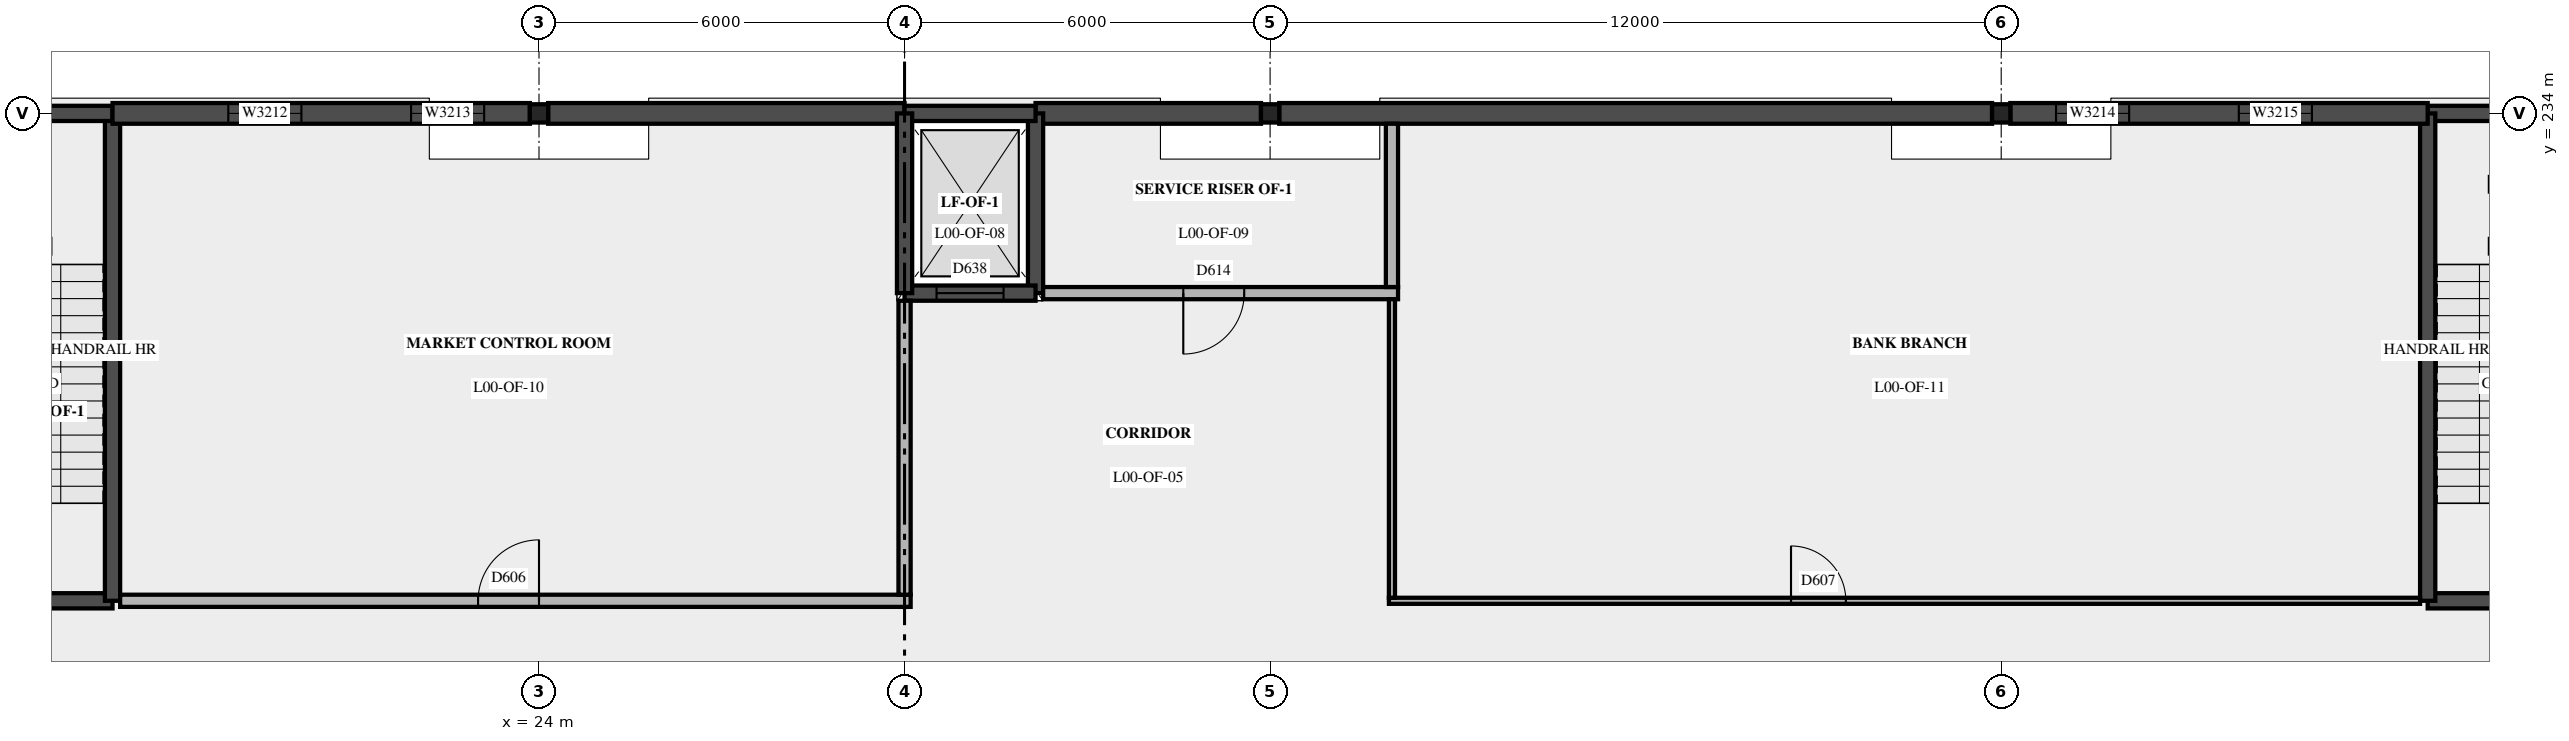
"""IFC4 building model, lengths in metres.
Left out: names, types, materials, properties, quantities, classifications, styles, units other than length and angle.
Written with IfcOpenShell. Run it as: python <this file> out.ifc"""

import sys

from ifc_helpers import new_model, si_unit, direction, frame, frame_2d, origin, origin_2d, place, context, subcontext, project, spatial, rectangle, i_section, extrude, element, fill, save


model = new_model("IFC4")
c1 = context("Model", 3, precision=1e-05, world=origin(), true_north=direction((0.0, 1.0)))
c2 = subcontext(c1, "Body", "Model", "MODEL_VIEW")
j1 = project(units=[si_unit("LENGTHUNIT", "METRE"), si_unit("PLANEANGLEUNIT", "RADIAN")], contexts=[c1])
p1 = place(None, origin())
s1 = spatial("IfcSite", under=j1, at=p1, CompositionType="ELEMENT")
p2 = place(p1, origin())
s2 = spatial("IfcBuilding", under=s1, at=p2, CompositionType="ELEMENT")
p3 = place(p2, origin())
s3 = spatial("IfcBuildingStorey", under=s2, at=p3, CompositionType="ELEMENT", Elevation=0.0)
for number, where, z_axis, x_axis in (
    (1, (24.0, 234.0, 0.0), (0.0, 0.0, 1.0), (1.0, 0.0, 0.0)),
    (2, (36.0, 234.0, 0.0), (0.0, 0.0, 1.0), (1.0, 0.0, 0.0)),
    (3, (48.0, 234.0, 0.0), (0.0, 0.0, 1.0), (1.0, 0.0, 0.0)),
):
    element("IfcColumn", number, at=place(p3, frame(where, z_axis=z_axis, x_axis=x_axis)), inside=s3, PredefinedType="COLUMN", context=c2, shape_type="SweptSolid", body=[
        extrude(i_section(OverallWidth=0.3, OverallDepth=0.3, WebThickness=0.011, FlangeThickness=0.019, at=origin_2d()), origin(), (0.0, 0.0, 1.0), 5.4),
    ])
p4 = place(p3, frame((12.0, 226.0, 0.0), z_axis=(0.0, 0.0, 1.0), x_axis=(1.0, 0.0, 0.0)))
e4 = element("IfcWall", 4, at=p4, inside=s3, PredefinedType="SHEAR", context=c2, shape_type="SweptSolid", body=[
    extrude(rectangle(XDim=5.0, YDim=0.25, at=frame_2d((2.5, 0.0))), origin(), (0.0, 0.0, 1.0), 5.4),
])
p5 = place(p4, frame((2.0, 0.0, 0.0)))
e5 = element("IfcOpeningElement", 5, at=p5, cuts=e4, PredefinedType="OPENING", context=c2, shape_type="SweptSolid", body=[
    extrude(rectangle(XDim=1.0, YDim=2.1, at=frame_2d((0.5, 1.05))), frame((0.0, 0.135, 0.0), z_axis=(0.0, -1.0, 0.0), x_axis=(1.0, 0.0, 0.0)), (0.0, 0.0, 1.0), 0.27),
])
p6 = place(p3, frame((17.0, 226.0, 0.0), z_axis=(0.0, 0.0, 1.0), x_axis=(0.0, 1.0, 0.0)))
e6 = element("IfcWall", 6, at=p6, inside=s3, PredefinedType="SHEAR", context=c2, shape_type="SweptSolid", body=[
    extrude(rectangle(XDim=8.0, YDim=0.25, at=frame_2d((4.0, 0.0))), origin(), (0.0, 0.0, 1.0), 5.4),
])
p7 = place(p3, frame((12.6, 234.0, 0.0), z_axis=(0.0, 0.0, 1.0), x_axis=(1.0, 0.0, 0.0)))
e7 = element("IfcWall", 7, at=p7, inside=s3, PredefinedType="SHEAR", context=c2, shape_type="SweptSolid", body=[
    extrude(rectangle(XDim=4.4, YDim=0.25, at=frame_2d((2.2, 0.0))), origin(), (0.0, 0.0, 1.0), 5.4),
])
p8 = place(p7, frame((1.4, 0.0, 0.0)))
e8 = element("IfcOpeningElement", 8, at=p8, cuts=e7, PredefinedType="OPENING", context=c2, shape_type="SweptSolid", body=[
    extrude(rectangle(XDim=1.0, YDim=2.1, at=frame_2d((0.5, 1.05))), frame((0.0, 0.135, 0.0), z_axis=(0.0, -1.0, 0.0), x_axis=(1.0, 0.0, 0.0)), (0.0, 0.0, 1.0), 0.27),
])
p9 = place(p3, frame((55.0, 226.0, 0.0), z_axis=(0.0, 0.0, 1.0), x_axis=(1.0, 0.0, 0.0)))
e9 = element("IfcWall", 9, at=p9, inside=s3, PredefinedType="SHEAR", context=c2, shape_type="SweptSolid", body=[
    extrude(rectangle(XDim=5.0, YDim=0.25, at=frame_2d((2.5, 0.0))), origin(), (0.0, 0.0, 1.0), 5.4),
])
p10 = place(p9, frame((2.0, 0.0, 0.0)))
e10 = element("IfcOpeningElement", 10, at=p10, cuts=e9, PredefinedType="OPENING", context=c2, shape_type="SweptSolid", body=[
    extrude(rectangle(XDim=1.0, YDim=2.1, at=frame_2d((0.5, 1.05))), frame((0.0, 0.135, 0.0), z_axis=(0.0, -1.0, 0.0), x_axis=(1.0, 0.0, 0.0)), (0.0, 0.0, 1.0), 0.27),
])
p11 = place(p3, frame((55.0, 234.0, 0.0), z_axis=(0.0, 0.0, 1.0), x_axis=(1.0, 0.0, 0.0)))
e11 = element("IfcWall", 11, at=p11, inside=s3, PredefinedType="SHEAR", context=c2, shape_type="SweptSolid", body=[
    extrude(rectangle(XDim=4.4, YDim=0.25, at=frame_2d((2.2, 0.0))), origin(), (0.0, 0.0, 1.0), 5.4),
])
p12 = place(p11, frame((2.0, 0.0, 0.0)))
e12 = element("IfcOpeningElement", 12, at=p12, cuts=e11, PredefinedType="OPENING", context=c2, shape_type="SweptSolid", body=[
    extrude(rectangle(XDim=1.0, YDim=2.1, at=frame_2d((0.5, 1.05))), frame((0.0, 0.135, 0.0), z_axis=(0.0, -1.0, 0.0), x_axis=(1.0, 0.0, 0.0)), (0.0, 0.0, 1.0), 0.27),
])
p13 = place(p3, frame((55.0, 226.0, 0.0), z_axis=(0.0, 0.0, 1.0), x_axis=(0.0, 1.0, 0.0)))
e13 = element("IfcWall", 13, at=p13, inside=s3, PredefinedType="SHEAR", context=c2, shape_type="SweptSolid", body=[
    extrude(rectangle(XDim=8.0, YDim=0.25, at=frame_2d((4.0, 0.0))), origin(), (0.0, 0.0, 1.0), 5.4),
])
p14 = place(p3, frame((17.0, 234.0, 0.0), z_axis=(0.0, 0.0, 1.0), x_axis=(1.0, 0.0, 0.0)))
e14 = element("IfcWall", 14, at=p14, inside=s3, PredefinedType="SOLIDWALL", context=c2, shape_type="SweptSolid", body=[
    extrude(rectangle(XDim=6.85, YDim=0.34, at=frame_2d((3.425, 0.0))), origin(), (0.0, 0.0, 1.0), 5.4),
])
p15 = place(p14, frame((1.9, 0.0, 0.9)))
e15 = element("IfcOpeningElement", 15, at=p15, cuts=e14, PredefinedType="OPENING", context=c2, shape_type="SweptSolid", body=[
    extrude(rectangle(XDim=1.2, YDim=3.3, at=frame_2d((0.6, 1.65))), frame((0.0, 0.18, 0.0), z_axis=(0.0, -1.0, 0.0), x_axis=(1.0, 0.0, 0.0)), (0.0, 0.0, 1.0), 0.36),
])
p16 = place(p14, frame((4.9, 0.0, 0.9)))
e16 = element("IfcOpeningElement", 16, at=p16, cuts=e14, PredefinedType="OPENING", context=c2, shape_type="SweptSolid", body=[
    extrude(rectangle(XDim=1.2, YDim=3.3, at=frame_2d((0.6, 1.65))), frame((0.0, 0.18, 0.0), z_axis=(0.0, -1.0, 0.0), x_axis=(1.0, 0.0, 0.0)), (0.0, 0.0, 1.0), 0.36),
])
p17 = place(p3, frame((24.15, 234.0, 0.0), z_axis=(0.0, 0.0, 1.0), x_axis=(1.0, 0.0, 0.0)))
e17 = element("IfcWall", 17, at=p17, inside=s3, PredefinedType="SOLIDWALL", context=c2, shape_type="SweptSolid", body=[
    extrude(rectangle(XDim=5.85, YDim=0.34, at=frame_2d((2.925, 0.0))), origin(), (0.0, 0.0, 1.0), 5.4),
])
p18 = place(p3, frame((32.15, 234.0, 0.0), z_axis=(0.0, 0.0, 1.0), x_axis=(1.0, 0.0, 0.0)))
e18 = element("IfcWall", 18, at=p18, inside=s3, PredefinedType="SOLIDWALL", context=c2, shape_type="SweptSolid", body=[
    extrude(rectangle(XDim=3.7, YDim=0.34, at=frame_2d((1.85, 0.0))), origin(), (0.0, 0.0, 1.0), 5.4),
])
p19 = place(p3, frame((36.15, 234.0, 0.0), z_axis=(0.0, 0.0, 1.0), x_axis=(1.0, 0.0, 0.0)))
e19 = element("IfcWall", 19, at=p19, inside=s3, PredefinedType="SOLIDWALL", context=c2, shape_type="SweptSolid", body=[
    extrude(rectangle(XDim=11.7, YDim=0.34, at=frame_2d((5.85, 0.0))), origin(), (0.0, 0.0, 1.0), 5.4),
])
p20 = place(p3, frame((48.15, 234.0, 0.0), z_axis=(0.0, 0.0, 1.0), x_axis=(1.0, 0.0, 0.0)))
e20 = element("IfcWall", 20, at=p20, inside=s3, PredefinedType="SOLIDWALL", context=c2, shape_type="SweptSolid", body=[
    extrude(rectangle(XDim=6.85, YDim=0.34, at=frame_2d((3.425, 0.0))), origin(), (0.0, 0.0, 1.0), 5.4),
])
p21 = place(p20, frame((0.75, 0.0, 0.9)))
e21 = element("IfcOpeningElement", 21, at=p21, cuts=e20, PredefinedType="OPENING", context=c2, shape_type="SweptSolid", body=[
    extrude(rectangle(XDim=1.2, YDim=3.3, at=frame_2d((0.6, 1.65))), frame((0.0, 0.18, 0.0), z_axis=(0.0, -1.0, 0.0), x_axis=(1.0, 0.0, 0.0)), (0.0, 0.0, 1.0), 0.36),
])
p22 = place(p20, frame((3.75, 0.0, 0.9)))
e22 = element("IfcOpeningElement", 22, at=p22, cuts=e20, PredefinedType="OPENING", context=c2, shape_type="SweptSolid", body=[
    extrude(rectangle(XDim=1.2, YDim=3.3, at=frame_2d((0.6, 1.65))), frame((0.0, 0.18, 0.0), z_axis=(0.0, -1.0, 0.0), x_axis=(1.0, 0.0, 0.0)), (0.0, 0.0, 1.0), 0.36),
])
p23 = place(p3, frame((32.15, 231.05, -1.4), z_axis=(0.0, 0.0, 1.0), x_axis=(0.0, 1.0, 0.0)))
e23 = element("IfcWall", 23, at=p23, inside=s3, PredefinedType="SHEAR", context=c2, shape_type="SweptSolid", body=[
    extrude(rectangle(XDim=2.95, YDim=0.25, at=frame_2d((1.475, 0.0))), origin(), (0.0, 0.0, 1.0), 6.8),
])
p24 = place(p3, frame((32.15, 234.0, -1.4), z_axis=(0.0, 0.0, 1.0), x_axis=(-1.0, 0.0, 0.0)))
e24 = element("IfcWall", 24, at=p24, inside=s3, PredefinedType="SHEAR", context=c2, shape_type="SweptSolid", body=[
    extrude(rectangle(XDim=2.15, YDim=0.25, at=frame_2d((1.075, 0.0))), origin(), (0.0, 0.0, 1.0), 6.8),
])
p25 = place(p3, frame((30.0, 231.05, -1.4), z_axis=(0.0, 0.0, 1.0), x_axis=(1.0, 0.0, 0.0)))
e25 = element("IfcWall", 25, at=p25, inside=s3, PredefinedType="SHEAR", context=c2, shape_type="SweptSolid", body=[
    extrude(rectangle(XDim=2.15, YDim=0.25, at=frame_2d((1.075, 0.0))), origin(), (0.0, 0.0, 1.0), 6.8),
])
p26 = place(p25, frame((0.525, 0.0, 1.4)))
e26 = element("IfcOpeningElement", 26, at=p26, cuts=e25, PredefinedType="OPENING", context=c2, shape_type="SweptSolid", body=[
    extrude(rectangle(XDim=1.1, YDim=2.1, at=frame_2d((0.55, 1.05))), frame((0.0, 0.135, 0.0), z_axis=(0.0, -1.0, 0.0), x_axis=(1.0, 0.0, 0.0)), (0.0, 0.0, 1.0), 0.27),
])
p27 = place(p3, frame((30.0, 234.0, -1.4), z_axis=(0.0, 0.0, 1.0), x_axis=(0.0, -1.0, 0.0)))
e27 = element("IfcWall", 27, at=p27, inside=s3, PredefinedType="SHEAR", context=c2, shape_type="SweptSolid", body=[
    extrude(rectangle(XDim=2.95, YDim=0.25, at=frame_2d((1.475, 0.0))), origin(), (0.0, 0.0, 1.0), 6.8),
])
p28 = place(p3, frame((17.125, 226.0, 0.0), z_axis=(0.0, 0.0, 1.0), x_axis=(1.0, 0.0, 0.0)))
e28 = element("IfcWall", 28, at=p28, inside=s3, PredefinedType="PARTITIONING", context=c2, shape_type="SweptSolid", body=[
    extrude(rectangle(XDim=12.975, YDim=0.2, at=frame_2d((6.488, 0.0))), origin(), (0.0, 0.0, 1.0), 4.7),
])
p29 = place(p28, frame((5.875, 0.0, 0.0)))
e29 = element("IfcOpeningElement", 29, at=p29, cuts=e28, PredefinedType="OPENING", context=c2, shape_type="SweptSolid", body=[
    extrude(rectangle(XDim=1.0, YDim=2.1, at=frame_2d((0.5, 1.05))), frame((0.0, 0.11, 0.0), z_axis=(0.0, -1.0, 0.0), x_axis=(1.0, 0.0, 0.0)), (0.0, 0.0, 1.0), 0.22),
])
p30 = place(p3, frame((37.95, 226.0, 0.0), z_axis=(0.0, 0.0, 1.0), x_axis=(1.0, 0.0, 0.0)))
e30 = element("IfcWall", 30, at=p30, inside=s3, PredefinedType="PARTITIONING", context=c2, shape_type="SweptSolid", body=[
    extrude(rectangle(XDim=16.925, YDim=0.1, at=frame_2d((8.462, 0.0))), origin(), (0.0, 0.0, 1.0), 4.7),
])
p31 = place(p30, frame((6.6, 0.0, 0.0)))
e31 = element("IfcOpeningElement", 31, at=p31, cuts=e30, PredefinedType="OPENING", context=c2, shape_type="SweptSolid", body=[
    extrude(rectangle(XDim=0.9, YDim=2.1, at=frame_2d((0.45, 1.05))), frame((0.0, 0.06, 0.0), z_axis=(0.0, -1.0, 0.0), x_axis=(1.0, 0.0, 0.0)), (0.0, 0.0, 1.0), 0.12),
])
p32 = place(p3, frame((32.275, 231.05, 0.0), z_axis=(0.0, 0.0, 1.0), x_axis=(1.0, 0.0, 0.0)))
e32 = element("IfcWall", 32, at=p32, inside=s3, PredefinedType="PARTITIONING", context=c2, shape_type="SweptSolid", body=[
    extrude(rectangle(XDim=5.825, YDim=0.2, at=frame_2d((2.913, 0.0))), origin(), (0.0, 0.0, 1.0), 4.7),
])
p33 = place(p32, frame((2.3, 0.0, 0.0)))
e33 = element("IfcOpeningElement", 33, at=p33, cuts=e32, PredefinedType="OPENING", context=c2, shape_type="SweptSolid", body=[
    extrude(rectangle(XDim=1.0, YDim=2.1, at=frame_2d((0.5, 1.05))), frame((0.0, 0.11, 0.0), z_axis=(0.0, -1.0, 0.0), x_axis=(1.0, 0.0, 0.0)), (0.0, 0.0, 1.0), 0.22),
])
p34 = place(p3, frame((30.0, 226.1, 0.0), z_axis=(0.0, 0.0, 1.0), x_axis=(0.0, 1.0, 0.0)))
e34 = element("IfcWall", 34, at=p34, inside=s3, PredefinedType="PARTITIONING", context=c2, shape_type="SweptSolid", body=[
    extrude(rectangle(XDim=4.825, YDim=0.2, at=frame_2d((2.413, 0.0))), origin(), (0.0, 0.0, 1.0), 4.79),
])
p35 = place(p3, frame((38.0, 226.05, 0.0), z_axis=(0.0, 0.0, 1.0), x_axis=(0.0, 1.0, 0.0)))
e35 = element("IfcWall", 35, at=p35, inside=s3, PredefinedType="PARTITIONING", context=c2, shape_type="SweptSolid", body=[
    extrude(rectangle(XDim=4.9, YDim=0.1, at=frame_2d((2.45, 0.0))), origin(), (0.0, 0.0, 1.0), 5.15),
])
p36 = place(p3, frame((38.0, 231.15, 0.0), z_axis=(0.0, 0.0, 1.0), x_axis=(0.0, 1.0, 0.0)))
e36 = element("IfcWall", 36, at=p36, inside=s3, PredefinedType="PARTITIONING", context=c2, shape_type="SweptSolid", body=[
    extrude(rectangle(XDim=2.68, YDim=0.2, at=frame_2d((1.34, 0.0))), origin(), (0.0, 0.0, 1.0), 5.15),
])
p37 = place(p15, origin())
e37 = element("IfcWindow", 37, at=p37, inside=s3, PartitioningType="SINGLE_PANEL", PredefinedType="WINDOW", context=c2, shape_type="SweptSolid", body=[
    extrude(rectangle(XDim=1.2, YDim=3.3, at=frame_2d((0.6, 1.65))), frame((0.0, 0.03, 0.0), z_axis=(0.0, -1.0, 0.0), x_axis=(1.0, 0.0, 0.0)), (0.0, 0.0, 1.0), 0.06),
])
fill(e15, e37)
p38 = place(p16, origin())
e38 = element("IfcWindow", 38, at=p38, inside=s3, PartitioningType="SINGLE_PANEL", PredefinedType="WINDOW", context=c2, shape_type="SweptSolid", body=[
    extrude(rectangle(XDim=1.2, YDim=3.3, at=frame_2d((0.6, 1.65))), frame((0.0, 0.03, 0.0), z_axis=(0.0, -1.0, 0.0), x_axis=(1.0, 0.0, 0.0)), (0.0, 0.0, 1.0), 0.06),
])
fill(e16, e38)
p39 = place(p21, origin())
e39 = element("IfcWindow", 39, at=p39, inside=s3, PartitioningType="SINGLE_PANEL", PredefinedType="WINDOW", context=c2, shape_type="SweptSolid", body=[
    extrude(rectangle(XDim=1.2, YDim=3.3, at=frame_2d((0.6, 1.65))), frame((0.0, 0.03, 0.0), z_axis=(0.0, -1.0, 0.0), x_axis=(1.0, 0.0, 0.0)), (0.0, 0.0, 1.0), 0.06),
])
fill(e21, e39)
p40 = place(p22, origin())
e40 = element("IfcWindow", 40, at=p40, inside=s3, PartitioningType="SINGLE_PANEL", PredefinedType="WINDOW", context=c2, shape_type="SweptSolid", body=[
    extrude(rectangle(XDim=1.2, YDim=3.3, at=frame_2d((0.6, 1.65))), frame((0.0, 0.03, 0.0), z_axis=(0.0, -1.0, 0.0), x_axis=(1.0, 0.0, 0.0)), (0.0, 0.0, 1.0), 0.06),
])
fill(e22, e40)
p41 = place(p26, origin())
e41 = element("IfcDoor", 41, at=p41, inside=s3, OperationType="SLIDING_TO_LEFT", PredefinedType="DOOR", context=c2, shape_type="SweptSolid", body=[
    extrude(rectangle(XDim=1.1, YDim=2.1, at=frame_2d((0.55, 1.05))), frame((0.0, 0.025, 0.0), z_axis=(0.0, -1.0, 0.0), x_axis=(1.0, 0.0, 0.0)), (0.0, 0.0, 1.0), 0.05),
])
fill(e26, e41)
p42 = place(p29, origin())
e42 = element("IfcDoor", 42, at=p42, inside=s3, OperationType="SINGLE_SWING_RIGHT", PredefinedType="DOOR", context=c2, shape_type="SweptSolid", body=[
    extrude(rectangle(XDim=1.0, YDim=2.1, at=frame_2d((0.5, 1.05))), frame((0.0, 0.025, 0.0), z_axis=(0.0, -1.0, 0.0), x_axis=(1.0, 0.0, 0.0)), (0.0, 0.0, 1.0), 0.05),
])
fill(e29, e42)
p43 = place(p31, origin())
e43 = element("IfcDoor", 43, at=p43, inside=s3, OperationType="SINGLE_SWING_LEFT", PredefinedType="DOOR", context=c2, shape_type="SweptSolid", body=[
    extrude(rectangle(XDim=0.9, YDim=2.1, at=frame_2d((0.45, 1.05))), frame((0.0, 0.025, 0.0), z_axis=(0.0, -1.0, 0.0), x_axis=(1.0, 0.0, 0.0)), (0.0, 0.0, 1.0), 0.05),
])
fill(e31, e43)
p44 = place(p33, origin())
e44 = element("IfcDoor", 44, at=p44, inside=s3, OperationType="SINGLE_SWING_RIGHT", PredefinedType="DOOR", context=c2, shape_type="SweptSolid", body=[
    extrude(rectangle(XDim=1.0, YDim=2.1, at=frame_2d((0.5, 1.05))), frame((0.0, 0.025, 0.0), z_axis=(0.0, -1.0, 0.0), x_axis=(1.0, 0.0, 0.0)), (0.0, 0.0, 1.0), 0.05),
])
fill(e33, e44)
save(model, sys.argv[1])
